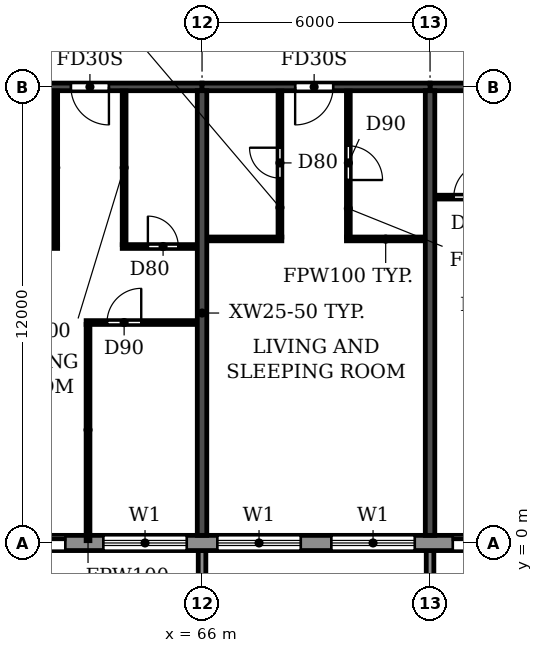
"""IFC4 building model, lengths in metres.
Left out: names, types, materials, properties, quantities, classifications, styles, units other than length and angle.
Written with IfcOpenShell. Run it as: python <this file> out.ifc"""

import sys

from ifc_helpers import new_model, si_unit, direction, frame, frame_2d, origin, place, context, subcontext, project, spatial, polyline, rectangle, outline, extrude, source, transform, mapped, element, fill, save


model = new_model("IFC4")
c1 = context("Model", 3, precision=1e-05, world=origin(), true_north=direction((0.0, 1.0)))
c2 = subcontext(c1, "Body", "Model", "MODEL_VIEW")
j1 = project(units=[si_unit("LENGTHUNIT", "METRE"), si_unit("PLANEANGLEUNIT", "RADIAN")], contexts=[c1])
p1 = place(None, origin())
s1 = spatial("IfcSite", under=j1, at=p1, CompositionType="ELEMENT")
p2 = place(p1, origin())
s2 = spatial("IfcBuilding", under=s1, at=p2, CompositionType="ELEMENT")
p3 = place(p2, frame((0.0, 0.0, 221.4)))
s3 = spatial("IfcBuildingStorey", under=s2, at=p3, CompositionType="ELEMENT", Elevation=221.4)
for number, where, z_axis, x_axis in (
    (1, (66.0, 0.2, 0.0), (0.0, 0.0, 1.0), (0.0, 1.0, 0.0)),
    (2, (72.0, 0.2, 0.0), (0.0, 0.0, 1.0), (0.0, 1.0, 0.0)),
):
    element("IfcWall", number, at=place(p3, frame(where, z_axis=z_axis, x_axis=x_axis)), inside=s3, PredefinedType="SHEAR", context=c2, shape_type="SweptSolid", body=[
        extrude(rectangle(XDim=11.7, YDim=0.25, at=frame_2d((5.85, 0.0))), origin(), (0.0, 0.0, 1.0), 3.08),
    ])
p4 = place(p3, frame((60.0, 12.0, 0.0), z_axis=(0.0, 0.0, 1.0), x_axis=(1.0, 0.0, 0.0)))
e3 = element("IfcWall", 3, at=p4, inside=s3, PredefinedType="SHEAR", context=c2, shape_type="SweptSolid", body=[
    extrude(rectangle(XDim=6.0, YDim=0.2, at=frame_2d((3.0, 0.0))), origin(), (0.0, 0.0, 1.0), 2.48),
])
p5 = place(p4, frame((2.55, 0.0, 0.0)))
e4 = element("IfcOpeningElement", 4, at=p5, cuts=e3, PredefinedType="OPENING", context=c2, shape_type="SweptSolid", body=[
    extrude(rectangle(XDim=1.0, YDim=2.1, at=frame_2d((0.5, 1.05))), frame((0.0, 0.11, 0.0), z_axis=(0.0, -1.0, 0.0), x_axis=(1.0, 0.0, 0.0)), (0.0, 0.0, 1.0), 0.22),
])
p6 = place(p3, frame((66.0, 12.0, 0.0), z_axis=(0.0, 0.0, 1.0), x_axis=(1.0, 0.0, 0.0)))
e5 = element("IfcWall", 5, at=p6, inside=s3, PredefinedType="SHEAR", context=c2, shape_type="SweptSolid", body=[
    extrude(rectangle(XDim=6.0, YDim=0.2, at=frame_2d((3.0, 0.0))), origin(), (0.0, 0.0, 1.0), 2.48),
])
p7 = place(p6, frame((2.45, 0.0, 0.0)))
e6 = element("IfcOpeningElement", 6, at=p7, cuts=e5, PredefinedType="OPENING", context=c2, shape_type="SweptSolid", body=[
    extrude(rectangle(XDim=1.0, YDim=2.1, at=frame_2d((0.5, 1.05))), frame((0.0, 0.11, 0.0), z_axis=(0.0, -1.0, 0.0), x_axis=(1.0, 0.0, 0.0)), (0.0, 0.0, 1.0), 0.22),
])
p8 = place(p3, frame((72.0, 12.0, 0.0), z_axis=(0.0, 0.0, 1.0), x_axis=(1.0, 0.0, 0.0)))
e7 = element("IfcWall", 7, at=p8, inside=s3, PredefinedType="SHEAR", context=c2, shape_type="SweptSolid", body=[
    extrude(rectangle(XDim=6.0, YDim=0.2, at=frame_2d((3.0, 0.0))), origin(), (0.0, 0.0, 1.0), 2.48),
])
p9 = place(p8, frame((2.55, 0.0, 0.0)))
e8 = element("IfcOpeningElement", 8, at=p9, cuts=e7, PredefinedType="OPENING", context=c2, shape_type="SweptSolid", body=[
    extrude(rectangle(XDim=1.0, YDim=2.1, at=frame_2d((0.5, 1.05))), frame((0.0, 0.11, 0.0), z_axis=(0.0, -1.0, 0.0), x_axis=(1.0, 0.0, 0.0)), (0.0, 0.0, 1.0), 0.22),
])
p10 = place(p3, frame((22.683, 0.0, 0.0), z_axis=(0.0, 0.0, 1.0), x_axis=(1.0, 0.0, 0.0)))
e9 = element("IfcWall", 9, at=p10, inside=s3, PredefinedType="STANDARD", context=c2, shape_type="SweptSolid", body=[
    extrude(rectangle(XDim=56.634, YDim=0.4, at=frame_2d((28.317, 0.0))), origin(), (0.0, 0.0, 1.0), 3.08),
])
p11 = place(p10, frame((1.717, 0.0, 0.9)))
e10 = element("IfcOpeningElement", 10, at=p11, cuts=e9, PredefinedType="OPENING", context=c2, shape_type="SweptSolid", body=[
    extrude(rectangle(XDim=2.2, YDim=1.5, at=frame_2d((1.1, 0.75))), frame((0.0, 0.21, 0.0), z_axis=(0.0, -1.0, 0.0), x_axis=(1.0, 0.0, 0.0)), (0.0, 0.0, 1.0), 0.42),
])
p12 = place(p10, frame((4.917, 0.0, 0.0)))
e11 = element("IfcOpeningElement", 11, at=p12, cuts=e9, PredefinedType="OPENING", context=c2, shape_type="SweptSolid", body=[
    extrude(rectangle(XDim=1.8, YDim=2.4, at=frame_2d((0.9, 1.2))), frame((0.0, 0.21, 0.0), z_axis=(0.0, -1.0, 0.0), x_axis=(1.0, 0.0, 0.0)), (0.0, 0.0, 1.0), 0.42),
])
p13 = place(p10, frame((7.717, 0.0, 0.9)))
e12 = element("IfcOpeningElement", 12, at=p13, cuts=e9, PredefinedType="OPENING", context=c2, shape_type="SweptSolid", body=[
    extrude(rectangle(XDim=2.2, YDim=1.5, at=frame_2d((1.1, 0.75))), frame((0.0, 0.21, 0.0), z_axis=(0.0, -1.0, 0.0), x_axis=(1.0, 0.0, 0.0)), (0.0, 0.0, 1.0), 0.42),
])
p14 = place(p10, frame((10.717, 0.0, 0.9)))
e13 = element("IfcOpeningElement", 13, at=p14, cuts=e9, PredefinedType="OPENING", context=c2, shape_type="SweptSolid", body=[
    extrude(rectangle(XDim=2.2, YDim=1.5, at=frame_2d((1.1, 0.75))), frame((0.0, 0.21, 0.0), z_axis=(0.0, -1.0, 0.0), x_axis=(1.0, 0.0, 0.0)), (0.0, 0.0, 1.0), 0.42),
])
p15 = place(p10, frame((13.717, 0.0, 0.9)))
e14 = element("IfcOpeningElement", 14, at=p15, cuts=e9, PredefinedType="OPENING", context=c2, shape_type="SweptSolid", body=[
    extrude(rectangle(XDim=2.2, YDim=1.5, at=frame_2d((1.1, 0.75))), frame((0.0, 0.21, 0.0), z_axis=(0.0, -1.0, 0.0), x_axis=(1.0, 0.0, 0.0)), (0.0, 0.0, 1.0), 0.42),
])
p16 = place(p10, frame((16.917, 0.0, 0.0)))
e15 = element("IfcOpeningElement", 15, at=p16, cuts=e9, PredefinedType="OPENING", context=c2, shape_type="SweptSolid", body=[
    extrude(rectangle(XDim=1.8, YDim=2.4, at=frame_2d((0.9, 1.2))), frame((0.0, 0.21, 0.0), z_axis=(0.0, -1.0, 0.0), x_axis=(1.0, 0.0, 0.0)), (0.0, 0.0, 1.0), 0.42),
])
p17 = place(p10, frame((19.717, 0.0, 0.9)))
e16 = element("IfcOpeningElement", 16, at=p17, cuts=e9, PredefinedType="OPENING", context=c2, shape_type="SweptSolid", body=[
    extrude(rectangle(XDim=2.2, YDim=1.5, at=frame_2d((1.1, 0.75))), frame((0.0, 0.21, 0.0), z_axis=(0.0, -1.0, 0.0), x_axis=(1.0, 0.0, 0.0)), (0.0, 0.0, 1.0), 0.42),
])
p18 = place(p10, frame((22.717, 0.0, 0.9)))
e17 = element("IfcOpeningElement", 17, at=p18, cuts=e9, PredefinedType="OPENING", context=c2, shape_type="SweptSolid", body=[
    extrude(rectangle(XDim=2.2, YDim=1.5, at=frame_2d((1.1, 0.75))), frame((0.0, 0.21, 0.0), z_axis=(0.0, -1.0, 0.0), x_axis=(1.0, 0.0, 0.0)), (0.0, 0.0, 1.0), 0.42),
])
p19 = place(p10, frame((25.917, 0.0, 0.0)))
e18 = element("IfcOpeningElement", 18, at=p19, cuts=e9, PredefinedType="OPENING", context=c2, shape_type="SweptSolid", body=[
    extrude(rectangle(XDim=1.8, YDim=2.4, at=frame_2d((0.9, 1.2))), frame((0.0, 0.21, 0.0), z_axis=(0.0, -1.0, 0.0), x_axis=(1.0, 0.0, 0.0)), (0.0, 0.0, 1.0), 0.42),
])
p20 = place(p10, frame((28.717, 0.0, 0.9)))
e19 = element("IfcOpeningElement", 19, at=p20, cuts=e9, PredefinedType="OPENING", context=c2, shape_type="SweptSolid", body=[
    extrude(rectangle(XDim=2.2, YDim=1.5, at=frame_2d((1.1, 0.75))), frame((0.0, 0.21, 0.0), z_axis=(0.0, -1.0, 0.0), x_axis=(1.0, 0.0, 0.0)), (0.0, 0.0, 1.0), 0.42),
])
p21 = place(p10, frame((31.717, 0.0, 0.9)))
e20 = element("IfcOpeningElement", 20, at=p21, cuts=e9, PredefinedType="OPENING", context=c2, shape_type="SweptSolid", body=[
    extrude(rectangle(XDim=2.2, YDim=1.5, at=frame_2d((1.1, 0.75))), frame((0.0, 0.21, 0.0), z_axis=(0.0, -1.0, 0.0), x_axis=(1.0, 0.0, 0.0)), (0.0, 0.0, 1.0), 0.42),
])
p22 = place(p10, frame((34.717, 0.0, 0.9)))
e21 = element("IfcOpeningElement", 21, at=p22, cuts=e9, PredefinedType="OPENING", context=c2, shape_type="SweptSolid", body=[
    extrude(rectangle(XDim=2.2, YDim=1.5, at=frame_2d((1.1, 0.75))), frame((0.0, 0.21, 0.0), z_axis=(0.0, -1.0, 0.0), x_axis=(1.0, 0.0, 0.0)), (0.0, 0.0, 1.0), 0.42),
])
p23 = place(p10, frame((37.917, 0.0, 0.0)))
e22 = element("IfcOpeningElement", 22, at=p23, cuts=e9, PredefinedType="OPENING", context=c2, shape_type="SweptSolid", body=[
    extrude(rectangle(XDim=1.8, YDim=2.4, at=frame_2d((0.9, 1.2))), frame((0.0, 0.21, 0.0), z_axis=(0.0, -1.0, 0.0), x_axis=(1.0, 0.0, 0.0)), (0.0, 0.0, 1.0), 0.42),
])
p24 = place(p10, frame((40.717, 0.0, 0.9)))
e23 = element("IfcOpeningElement", 23, at=p24, cuts=e9, PredefinedType="OPENING", context=c2, shape_type="SweptSolid", body=[
    extrude(rectangle(XDim=2.2, YDim=1.5, at=frame_2d((1.1, 0.75))), frame((0.0, 0.21, 0.0), z_axis=(0.0, -1.0, 0.0), x_axis=(1.0, 0.0, 0.0)), (0.0, 0.0, 1.0), 0.42),
])
p25 = place(p10, frame((43.717, 0.0, 0.9)))
e24 = element("IfcOpeningElement", 24, at=p25, cuts=e9, PredefinedType="OPENING", context=c2, shape_type="SweptSolid", body=[
    extrude(rectangle(XDim=2.2, YDim=1.5, at=frame_2d((1.1, 0.75))), frame((0.0, 0.21, 0.0), z_axis=(0.0, -1.0, 0.0), x_axis=(1.0, 0.0, 0.0)), (0.0, 0.0, 1.0), 0.42),
])
p26 = place(p10, frame((46.717, 0.0, 0.9)))
e25 = element("IfcOpeningElement", 25, at=p26, cuts=e9, PredefinedType="OPENING", context=c2, shape_type="SweptSolid", body=[
    extrude(rectangle(XDim=2.2, YDim=1.5, at=frame_2d((1.1, 0.75))), frame((0.0, 0.21, 0.0), z_axis=(0.0, -1.0, 0.0), x_axis=(1.0, 0.0, 0.0)), (0.0, 0.0, 1.0), 0.42),
])
p27 = place(p10, frame((49.917, 0.0, 0.0)))
e26 = element("IfcOpeningElement", 26, at=p27, cuts=e9, PredefinedType="OPENING", context=c2, shape_type="SweptSolid", body=[
    extrude(rectangle(XDim=1.8, YDim=2.4, at=frame_2d((0.9, 1.2))), frame((0.0, 0.21, 0.0), z_axis=(0.0, -1.0, 0.0), x_axis=(1.0, 0.0, 0.0)), (0.0, 0.0, 1.0), 0.42),
])
p28 = place(p10, frame((52.717, 0.0, 0.9)))
e27 = element("IfcOpeningElement", 27, at=p28, cuts=e9, PredefinedType="OPENING", context=c2, shape_type="SweptSolid", body=[
    extrude(rectangle(XDim=2.2, YDim=1.5, at=frame_2d((1.1, 0.75))), frame((0.0, 0.21, 0.0), z_axis=(0.0, -1.0, 0.0), x_axis=(1.0, 0.0, 0.0)), (0.0, 0.0, 1.0), 0.42),
])
m1 = source(origin(), c2, "Body", "SweptSolid", [
    extrude(outline(polyline([(0.0, 0.0), (0.2, 0.0), (0.2, 1.65), (0.0, 1.65), (0.0, 0.0)])), origin(), (0.0, 0.0, 1.0), 3.1),
])
for number, where in (
    (28, (65.9, -1.85, 0.0)),
    (29, (71.9, -1.85, 0.0)),
):
    element("IfcWall", number, at=place(p3, frame(where)), inside=s3, PredefinedType="STANDARD", context=c2, shape_type="MappedRepresentation", body=[
        mapped(m1, transform((0.0, 0.0, 0.0))),
    ])
p29 = place(p3, frame((62.95, 5.8, 0.0), z_axis=(0.0, 0.0, 1.0), x_axis=(1.0, 0.0, 0.0)))
e30 = element("IfcWall", 30, at=p29, inside=s3, PredefinedType="PARTITIONING", context=c2, shape_type="SweptSolid", body=[
    extrude(rectangle(XDim=2.915, YDim=0.1, at=frame_2d((1.458, 0.0))), origin(), (0.0, 0.0, 1.0), 3.08),
])
p30 = place(p29, frame((0.55, 0.0, 0.0)))
e31 = element("IfcOpeningElement", 31, at=p30, cuts=e30, PredefinedType="OPENING", context=c2, shape_type="SweptSolid", body=[
    extrude(rectangle(XDim=0.9, YDim=2.1, at=frame_2d((0.45, 1.05))), frame((0.0, 0.06, 0.0), z_axis=(0.0, -1.0, 0.0), x_axis=(1.0, 0.0, 0.0)), (0.0, 0.0, 1.0), 0.12),
])
p31 = place(p3, frame((60.135, 7.8, 0.0), z_axis=(0.0, 0.0, 1.0), x_axis=(1.0, 0.0, 0.0)))
e32 = element("IfcWall", 32, at=p31, inside=s3, PredefinedType="PARTITIONING", context=c2, shape_type="SweptSolid", body=[
    extrude(rectangle(XDim=2.065, YDim=0.1, at=frame_2d((1.032, 0.0))), origin(), (0.0, 0.0, 1.0), 3.08),
])
p32 = place(p31, frame((0.49, 0.0, 0.0)))
e33 = element("IfcOpeningElement", 33, at=p32, cuts=e32, PredefinedType="OPENING", context=c2, shape_type="SweptSolid", body=[
    extrude(rectangle(XDim=0.9, YDim=2.1, at=frame_2d((0.45, 1.05))), frame((0.0, 0.06, 0.0), z_axis=(0.0, -1.0, 0.0), x_axis=(1.0, 0.0, 0.0)), (0.0, 0.0, 1.0), 0.12),
])
p33 = place(p3, frame((63.9, 7.8, 0.0), z_axis=(0.0, 0.0, 1.0), x_axis=(1.0, 0.0, 0.0)))
e34 = element("IfcWall", 34, at=p33, inside=s3, PredefinedType="PARTITIONING", context=c2, shape_type="SweptSolid", body=[
    extrude(rectangle(XDim=1.965, YDim=0.1, at=frame_2d((0.982, 0.0))), origin(), (0.0, 0.0, 1.0), 3.08),
])
p34 = place(p33, frame((0.675, 0.0, 0.0)))
e35 = element("IfcOpeningElement", 35, at=p34, cuts=e34, PredefinedType="OPENING", context=c2, shape_type="SweptSolid", body=[
    extrude(rectangle(XDim=0.8, YDim=2.1, at=frame_2d((0.4, 1.05))), frame((0.0, 0.06, 0.0), z_axis=(0.0, -1.0, 0.0), x_axis=(1.0, 0.0, 0.0)), (0.0, 0.0, 1.0), 0.12),
])
p35 = place(p3, frame((66.135, 8.0, 0.0), z_axis=(0.0, 0.0, 1.0), x_axis=(1.0, 0.0, 0.0)))
e36 = element("IfcWall", 36, at=p35, inside=s3, PredefinedType="PARTITIONING", context=c2, shape_type="SweptSolid", body=[
    extrude(rectangle(XDim=1.965, YDim=0.1, at=frame_2d((0.982, 0.0))), origin(), (0.0, 0.0, 1.0), 3.08),
])
p36 = place(p3, frame((69.8, 8.0, 0.0), z_axis=(0.0, 0.0, 1.0), x_axis=(1.0, 0.0, 0.0)))
e37 = element("IfcWall", 37, at=p36, inside=s3, PredefinedType="PARTITIONING", context=c2, shape_type="SweptSolid", body=[
    extrude(rectangle(XDim=2.065, YDim=0.1, at=frame_2d((1.032, 0.0))), origin(), (0.0, 0.0, 1.0), 3.08),
])
p37 = place(p3, frame((72.135, 9.1, 0.0), z_axis=(0.0, 0.0, 1.0), x_axis=(1.0, 0.0, 0.0)))
e38 = element("IfcWall", 38, at=p37, inside=s3, PredefinedType="PARTITIONING", context=c2, shape_type="SweptSolid", body=[
    extrude(rectangle(XDim=2.065, YDim=0.1, at=frame_2d((1.032, 0.0))), origin(), (0.0, 0.0, 1.0), 3.08),
])
p38 = place(p37, frame((0.49, 0.0, 0.0)))
e39 = element("IfcOpeningElement", 39, at=p38, cuts=e38, PredefinedType="OPENING", context=c2, shape_type="SweptSolid", body=[
    extrude(rectangle(XDim=0.9, YDim=2.1, at=frame_2d((0.45, 1.05))), frame((0.0, 0.06, 0.0), z_axis=(0.0, -1.0, 0.0), x_axis=(1.0, 0.0, 0.0)), (0.0, 0.0, 1.0), 0.12),
])
p39 = place(p3, frame((62.15, 7.85, 0.0), z_axis=(0.0, 0.0, 1.0), x_axis=(0.0, 1.0, 0.0)))
e40 = element("IfcWall", 40, at=p39, inside=s3, PredefinedType="PARTITIONING", context=c2, shape_type="SweptSolid", body=[
    extrude(rectangle(XDim=4.04, YDim=0.1, at=frame_2d((2.02, 0.0))), origin(), (0.0, 0.0, 1.0), 3.08),
])
p40 = place(p3, frame((63.0, 0.06, 0.0), z_axis=(0.0, 0.0, 1.0), x_axis=(0.0, 1.0, 0.0)))
e41 = element("IfcWall", 41, at=p40, inside=s3, PredefinedType="PARTITIONING", context=c2, shape_type="SweptSolid", body=[
    extrude(rectangle(XDim=5.69, YDim=0.1, at=frame_2d((2.845, 0.0))), origin(), (0.0, 0.0, 1.0), 3.08),
])
p41 = place(p3, frame((63.95, 7.85, 0.0), z_axis=(0.0, 0.0, 1.0), x_axis=(0.0, 1.0, 0.0)))
e42 = element("IfcWall", 42, at=p41, inside=s3, PredefinedType="PARTITIONING", context=c2, shape_type="SweptSolid", body=[
    extrude(rectangle(XDim=4.04, YDim=0.1, at=frame_2d((2.02, 0.0))), origin(), (0.0, 0.0, 1.0), 3.08),
])
p42 = place(p3, frame((68.05, 8.05, 0.0), z_axis=(0.0, 0.0, 1.0), x_axis=(0.0, 1.0, 0.0)))
e43 = element("IfcWall", 43, at=p42, inside=s3, PredefinedType="PARTITIONING", context=c2, shape_type="SweptSolid", body=[
    extrude(rectangle(XDim=3.84, YDim=0.1, at=frame_2d((1.92, 0.0))), origin(), (0.0, 0.0, 1.0), 3.08),
])
p43 = place(p42, frame((1.55, 0.0, 0.0)))
e44 = element("IfcOpeningElement", 44, at=p43, cuts=e43, PredefinedType="OPENING", context=c2, shape_type="SweptSolid", body=[
    extrude(rectangle(XDim=0.8, YDim=2.1, at=frame_2d((0.4, 1.05))), frame((0.0, 0.06, 0.0), z_axis=(0.0, -1.0, 0.0), x_axis=(1.0, 0.0, 0.0)), (0.0, 0.0, 1.0), 0.12),
])
p44 = place(p3, frame((69.85, 8.05, 0.0), z_axis=(0.0, 0.0, 1.0), x_axis=(0.0, 1.0, 0.0)))
e45 = element("IfcWall", 45, at=p44, inside=s3, PredefinedType="PARTITIONING", context=c2, shape_type="SweptSolid", body=[
    extrude(rectangle(XDim=3.84, YDim=0.1, at=frame_2d((1.92, 0.0))), origin(), (0.0, 0.0, 1.0), 3.08),
])
p45 = place(p44, frame((1.5, 0.0, 0.0)))
e46 = element("IfcOpeningElement", 46, at=p45, cuts=e45, PredefinedType="OPENING", context=c2, shape_type="SweptSolid", body=[
    extrude(rectangle(XDim=0.9, YDim=2.1, at=frame_2d((0.45, 1.05))), frame((0.0, 0.06, 0.0), z_axis=(0.0, -1.0, 0.0), x_axis=(1.0, 0.0, 0.0)), (0.0, 0.0, 1.0), 0.12),
])
p46 = place(p23, origin())
e47 = element("IfcDoor", 47, at=p46, inside=s3, OperationType="DOUBLE_DOOR_SLIDING", PredefinedType="DOOR", context=c2, shape_type="SweptSolid", body=[
    extrude(rectangle(XDim=1.8, YDim=2.4, at=frame_2d((0.9, 1.2))), frame((0.0, 0.025, 0.0), z_axis=(0.0, -1.0, 0.0), x_axis=(1.0, 0.0, 0.0)), (0.0, 0.0, 1.0), 0.05),
])
fill(e22, e47)
p47 = place(p24, origin())
e48 = element("IfcWindow", 48, at=p47, inside=s3, PartitioningType="DOUBLE_PANEL_HORIZONTAL", PredefinedType="WINDOW", context=c2, shape_type="SweptSolid", body=[
    extrude(rectangle(XDim=2.2, YDim=1.5, at=frame_2d((1.1, 0.75))), frame((0.0, 0.03, 0.0), z_axis=(0.0, -1.0, 0.0), x_axis=(1.0, 0.0, 0.0)), (0.0, 0.0, 1.0), 0.06),
])
fill(e23, e48)
p48 = place(p25, origin())
e49 = element("IfcWindow", 49, at=p48, inside=s3, PartitioningType="DOUBLE_PANEL_HORIZONTAL", PredefinedType="WINDOW", context=c2, shape_type="SweptSolid", body=[
    extrude(rectangle(XDim=2.2, YDim=1.5, at=frame_2d((1.1, 0.75))), frame((0.0, 0.03, 0.0), z_axis=(0.0, -1.0, 0.0), x_axis=(1.0, 0.0, 0.0)), (0.0, 0.0, 1.0), 0.06),
])
fill(e24, e49)
p49 = place(p26, origin())
e50 = element("IfcWindow", 50, at=p49, inside=s3, PartitioningType="DOUBLE_PANEL_HORIZONTAL", PredefinedType="WINDOW", context=c2, shape_type="SweptSolid", body=[
    extrude(rectangle(XDim=2.2, YDim=1.5, at=frame_2d((1.1, 0.75))), frame((0.0, 0.03, 0.0), z_axis=(0.0, -1.0, 0.0), x_axis=(1.0, 0.0, 0.0)), (0.0, 0.0, 1.0), 0.06),
])
fill(e25, e50)
p50 = place(p27, origin())
e51 = element("IfcDoor", 51, at=p50, inside=s3, OperationType="DOUBLE_DOOR_SLIDING", PredefinedType="DOOR", context=c2, shape_type="SweptSolid", body=[
    extrude(rectangle(XDim=1.8, YDim=2.4, at=frame_2d((0.9, 1.2))), frame((0.0, 0.025, 0.0), z_axis=(0.0, -1.0, 0.0), x_axis=(1.0, 0.0, 0.0)), (0.0, 0.0, 1.0), 0.05),
])
fill(e26, e51)
p51 = place(p5, frame((1.0, 0.0, 0.0), z_axis=(0.0, 0.0, 1.0), x_axis=(-1.0, 0.0, 0.0)))
e52 = element("IfcDoor", 52, at=p51, inside=s3, OperationType="SINGLE_SWING_LEFT", PredefinedType="DOOR", context=c2, shape_type="SweptSolid", body=[
    extrude(rectangle(XDim=1.0, YDim=2.1, at=frame_2d((0.5, 1.05))), frame((0.0, 0.025, 0.0), z_axis=(0.0, -1.0, 0.0), x_axis=(1.0, 0.0, 0.0)), (0.0, 0.0, 1.0), 0.05),
])
fill(e4, e52)
p52 = place(p30, origin())
e53 = element("IfcDoor", 53, at=p52, inside=s3, OperationType="SINGLE_SWING_RIGHT", PredefinedType="DOOR", context=c2, shape_type="SweptSolid", body=[
    extrude(rectangle(XDim=0.9, YDim=2.1, at=frame_2d((0.45, 1.05))), frame((0.0, 0.025, 0.0), z_axis=(0.0, -1.0, 0.0), x_axis=(1.0, 0.0, 0.0)), (0.0, 0.0, 1.0), 0.05),
])
fill(e31, e53)
p53 = place(p34, origin())
e54 = element("IfcDoor", 54, at=p53, inside=s3, OperationType="SINGLE_SWING_LEFT", PredefinedType="DOOR", context=c2, shape_type="SweptSolid", body=[
    extrude(rectangle(XDim=0.8, YDim=2.1, at=frame_2d((0.4, 1.05))), frame((0.0, 0.025, 0.0), z_axis=(0.0, -1.0, 0.0), x_axis=(1.0, 0.0, 0.0)), (0.0, 0.0, 1.0), 0.05),
])
fill(e35, e54)
p54 = place(p43, origin())
e55 = element("IfcDoor", 55, at=p54, inside=s3, OperationType="SINGLE_SWING_RIGHT", PredefinedType="DOOR", context=c2, shape_type="SweptSolid", body=[
    extrude(rectangle(XDim=0.8, YDim=2.1, at=frame_2d((0.4, 1.05))), frame((0.0, 0.025, 0.0), z_axis=(0.0, -1.0, 0.0), x_axis=(1.0, 0.0, 0.0)), (0.0, 0.0, 1.0), 0.05),
])
fill(e44, e55)
p55 = place(p7, frame((1.0, 0.0, 0.0), z_axis=(0.0, 0.0, 1.0), x_axis=(-1.0, 0.0, 0.0)))
e56 = element("IfcDoor", 56, at=p55, inside=s3, OperationType="SINGLE_SWING_RIGHT", PredefinedType="DOOR", context=c2, shape_type="SweptSolid", body=[
    extrude(rectangle(XDim=1.0, YDim=2.1, at=frame_2d((0.5, 1.05))), frame((0.0, 0.025, 0.0), z_axis=(0.0, -1.0, 0.0), x_axis=(1.0, 0.0, 0.0)), (0.0, 0.0, 1.0), 0.05),
])
fill(e6, e56)
p56 = place(p45, frame((0.9, 0.0, 0.0), z_axis=(0.0, 0.0, 1.0), x_axis=(-1.0, 0.0, 0.0)))
e57 = element("IfcDoor", 57, at=p56, inside=s3, OperationType="SINGLE_SWING_RIGHT", PredefinedType="DOOR", context=c2, shape_type="SweptSolid", body=[
    extrude(rectangle(XDim=0.9, YDim=2.1, at=frame_2d((0.45, 1.05))), frame((0.0, 0.025, 0.0), z_axis=(0.0, -1.0, 0.0), x_axis=(1.0, 0.0, 0.0)), (0.0, 0.0, 1.0), 0.05),
])
fill(e46, e57)
p57 = place(p38, origin())
e58 = element("IfcDoor", 58, at=p57, inside=s3, OperationType="SINGLE_SWING_RIGHT", PredefinedType="DOOR", context=c2, shape_type="SweptSolid", body=[
    extrude(rectangle(XDim=0.9, YDim=2.1, at=frame_2d((0.45, 1.05))), frame((0.0, 0.025, 0.0), z_axis=(0.0, -1.0, 0.0), x_axis=(1.0, 0.0, 0.0)), (0.0, 0.0, 1.0), 0.05),
])
fill(e39, e58)
save(model, sys.argv[1])
